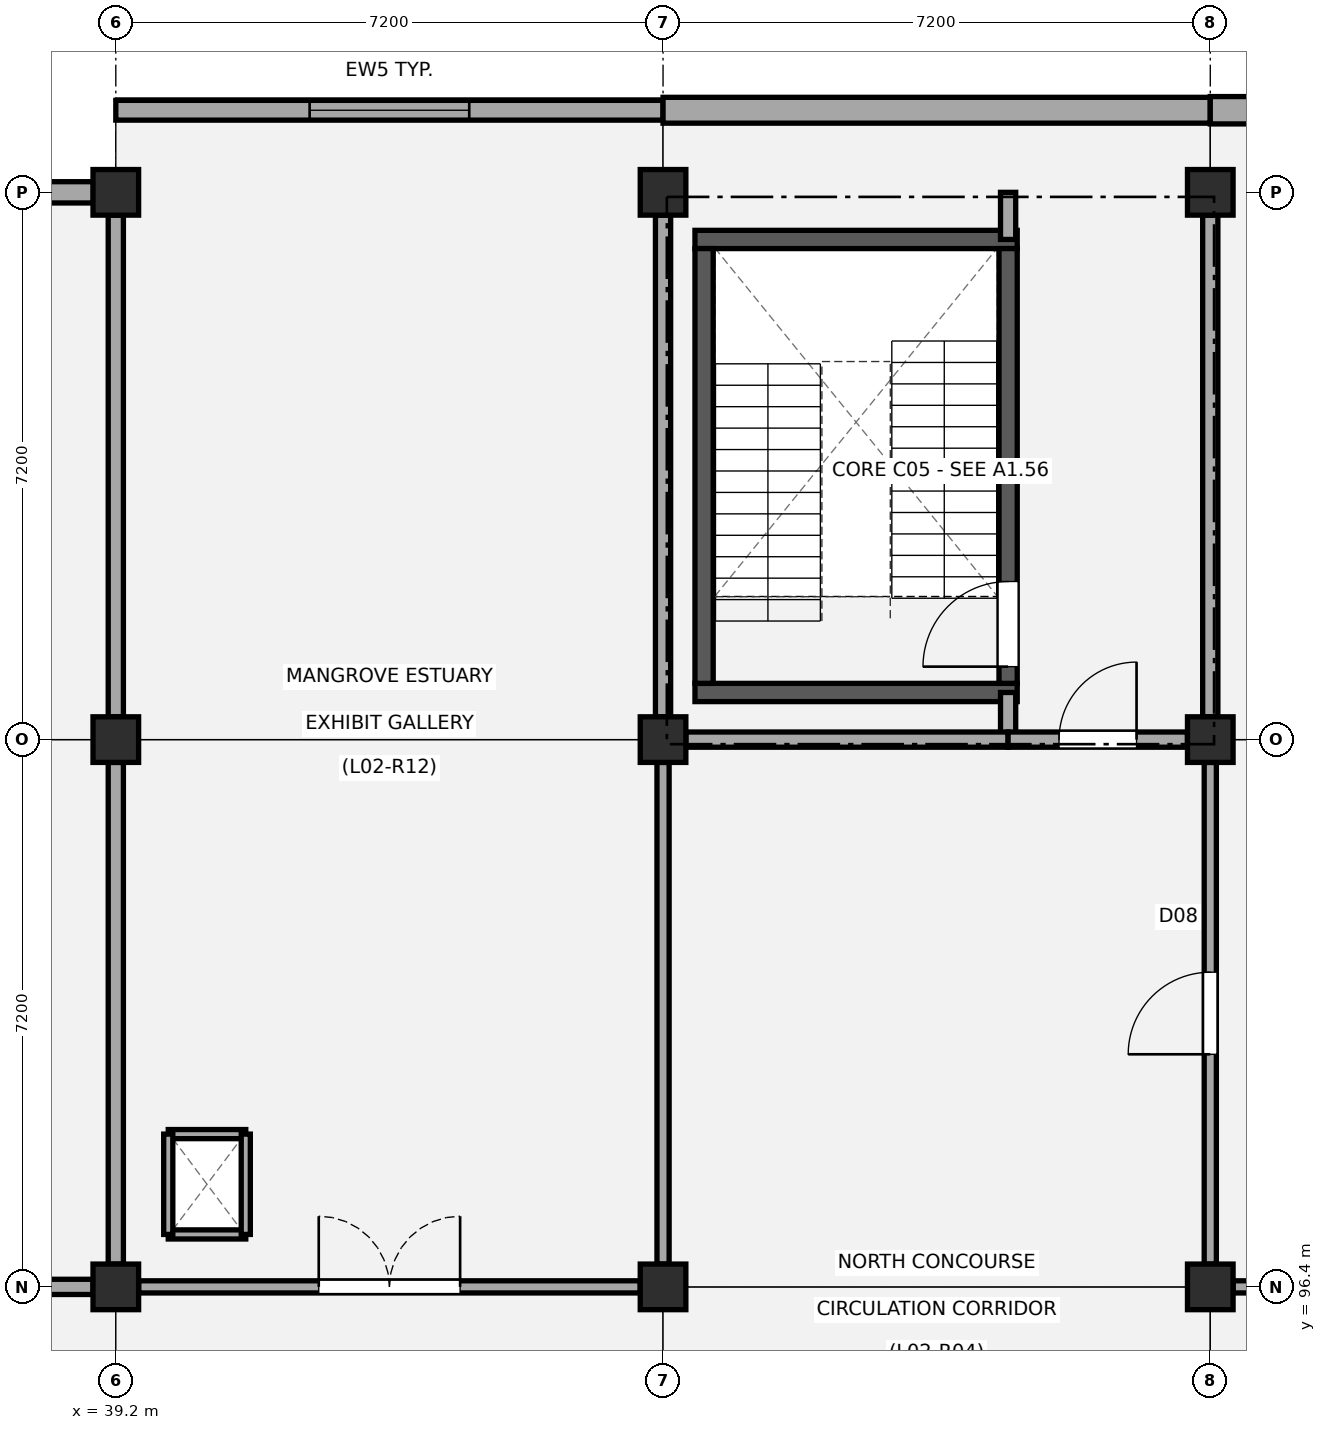
"""IFC4 building model, lengths in metres.
Left out: names, types, materials, properties, quantities, classifications, styles, units other than length and angle.
Written with IfcOpenShell. Run it as: python <this file> out.ifc"""

import sys

from ifc_helpers import new_model, si_unit, direction, frame, frame_2d, origin, origin_2d, place, context, subcontext, project, spatial, rectangle, extrude, element, fill, save


model = new_model("IFC4")
c1 = context("Model", 3, precision=1e-05, world=origin(), true_north=direction((0.0, 1.0)))
c2 = subcontext(c1, "Body", "Model", "MODEL_VIEW")
j1 = project(units=[si_unit("LENGTHUNIT", "METRE"), si_unit("PLANEANGLEUNIT", "RADIAN")], contexts=[c1])
p1 = place(None, origin())
s1 = spatial("IfcSite", under=j1, at=p1, CompositionType="ELEMENT")
p2 = place(p1, origin())
s2 = spatial("IfcBuilding", under=s1, at=p2, CompositionType="ELEMENT")
p3 = place(p2, frame((0.0, 0.0, 9.18)))
s3 = spatial("IfcBuildingStorey", under=s2, at=p3, CompositionType="ELEMENT", Elevation=9.18)
for number, where, z_axis, x_axis in (
    (1, (39.2, 96.4, 0.0), (0.0, 0.0, 1.0), (1.0, 0.0, 0.0)),
    (2, (39.2, 103.6, 0.0), (0.0, 0.0, 1.0), (1.0, 0.0, 0.0)),
    (3, (39.2, 110.8, 0.0), (0.0, 0.0, 1.0), (1.0, 0.0, 0.0)),
    (4, (46.4, 96.4, 0.0), (0.0, 0.0, 1.0), (1.0, 0.0, 0.0)),
    (5, (46.4, 103.6, 0.0), (0.0, 0.0, 1.0), (1.0, 0.0, 0.0)),
    (6, (46.4, 110.8, 0.0), (0.0, 0.0, 1.0), (1.0, 0.0, 0.0)),
    (7, (53.6, 96.4, 0.0), (0.0, 0.0, 1.0), (1.0, 0.0, 0.0)),
    (8, (53.6, 103.6, 0.0), (0.0, 0.0, 1.0), (1.0, 0.0, 0.0)),
    (9, (53.6, 110.8, 0.0), (0.0, 0.0, 1.0), (1.0, 0.0, 0.0)),
):
    element("IfcColumn", number, at=place(p3, frame(where, z_axis=z_axis, x_axis=x_axis)), inside=s3, PredefinedType="COLUMN", context=c2, shape_type="SweptSolid", body=[
        extrude(rectangle(XDim=0.6, YDim=0.6, at=origin_2d()), origin(), (0.0, 0.0, 1.0), 4.32),
    ])
p4 = place(p3, frame((32.295, 110.8, 0.0), z_axis=(0.0, 0.0, 1.0), x_axis=(1.0, 0.0, 0.0)))
e10 = element("IfcWall", 10, at=p4, inside=s3, PredefinedType="STANDARD", context=c2, shape_type="SweptSolid", body=[
    extrude(rectangle(XDim=6.61, YDim=0.28, at=frame_2d((3.305, 0.0))), origin(), (0.0, 0.0, 1.0), 3.48),
])
p5 = place(p3, frame((39.2, 111.88, 0.0), z_axis=(0.0, 0.0, 1.0), x_axis=(1.0, 0.0, 0.0)))
e11 = element("IfcWall", 11, at=p5, inside=s3, PredefinedType="STANDARD", context=c2, shape_type="SweptSolid", body=[
    extrude(rectangle(XDim=7.2, YDim=0.26, at=frame_2d((3.6, 0.0))), origin(), (0.0, 0.0, 1.0), 4.03),
])
p6 = place(p5, frame((2.55, 0.0, 0.95)))
e12 = element("IfcOpeningElement", 12, at=p6, cuts=e11, PredefinedType="OPENING", context=c2, shape_type="SweptSolid", body=[
    extrude(rectangle(XDim=2.1, YDim=1.95, at=frame_2d((1.05, 0.975))), frame((0.0, 0.14, 0.0), z_axis=(0.0, -1.0, 0.0), x_axis=(1.0, 0.0, 0.0)), (0.0, 0.0, 1.0), 0.28),
])
p7 = place(p3, frame((46.4, 111.88, 0.0), z_axis=(0.0, 0.0, 1.0), x_axis=(1.0, 0.0, 0.0)))
e13 = element("IfcWall", 13, at=p7, inside=s3, PredefinedType="STANDARD", context=c2, shape_type="SweptSolid", body=[
    extrude(rectangle(XDim=7.2, YDim=0.34, at=frame_2d((3.6, 0.0))), origin(), (0.0, 0.0, 1.0), 4.01),
])
p8 = place(p3, frame((53.6, 111.88, 0.0), z_axis=(0.0, 0.0, 1.0), x_axis=(1.0, 0.0, 0.0)))
e14 = element("IfcWall", 14, at=p8, inside=s3, PredefinedType="STANDARD", context=c2, shape_type="SweptSolid", body=[
    extrude(rectangle(XDim=7.2, YDim=0.36, at=frame_2d((3.6, 0.0))), origin(), (0.0, 0.0, 1.0), 4.03),
])
p9 = place(p8, frame((2.4, 0.0, 0.95)))
e15 = element("IfcOpeningElement", 15, at=p9, cuts=e14, PredefinedType="OPENING", context=c2, shape_type="SweptSolid", body=[
    extrude(rectangle(XDim=2.4, YDim=1.55, at=frame_2d((1.2, 0.775))), frame((0.0, 0.19, 0.0), z_axis=(0.0, -1.0, 0.0), x_axis=(1.0, 0.0, 0.0)), (0.0, 0.0, 1.0), 0.38),
])
for number, where, z_axis, x_axis in (
    (16, (46.82, 104.22, 0.0), (0.0, 0.0, 1.0), (1.0, 0.0, 0.0)),
    (17, (46.82, 110.18, 0.0), (0.0, 0.0, 1.0), (1.0, 0.0, 0.0)),
):
    element("IfcWall", number, at=place(p3, frame(where, z_axis=z_axis, x_axis=x_axis)), inside=s3, PredefinedType="SHEAR", context=c2, shape_type="SweptSolid", body=[
        extrude(rectangle(XDim=4.24, YDim=0.24, at=frame_2d((2.12, 0.0))), origin(), (0.0, 0.0, 1.0), 4.02),
    ])
p10 = place(p3, frame((46.94, 104.34, 0.0), z_axis=(0.0, 0.0, 1.0), x_axis=(0.0, 1.0, 0.0)))
e18 = element("IfcWall", 18, at=p10, inside=s3, PredefinedType="SHEAR", context=c2, shape_type="SweptSolid", body=[
    extrude(rectangle(XDim=5.72, YDim=0.24, at=frame_2d((2.86, 0.0))), origin(), (0.0, 0.0, 1.0), 4.02),
])
p11 = place(p3, frame((50.94, 104.34, 0.0), z_axis=(0.0, 0.0, 1.0), x_axis=(0.0, 1.0, 0.0)))
e19 = element("IfcWall", 19, at=p11, inside=s3, PredefinedType="SHEAR", context=c2, shape_type="SweptSolid", body=[
    extrude(rectangle(XDim=5.72, YDim=0.24, at=frame_2d((2.86, 0.0))), origin(), (0.0, 0.0, 1.0), 4.02),
])
p12 = place(p11, frame((0.22, 0.0, 0.0)))
e20 = element("IfcOpeningElement", 20, at=p12, cuts=e19, PredefinedType="OPENING", context=c2, shape_type="SweptSolid", body=[
    extrude(rectangle(XDim=1.12, YDim=2.15, at=frame_2d((0.56, 1.075))), frame((0.0, 0.13, 0.0), z_axis=(0.0, -1.0, 0.0), x_axis=(1.0, 0.0, 0.0)), (0.0, 0.0, 1.0), 0.26),
])
p13 = place(p3, frame((50.94, 103.6, 0.0), z_axis=(0.0, 0.0, 1.0), x_axis=(0.0, 1.0, 0.0)))
e21 = element("IfcWall", 21, at=p13, inside=s3, PredefinedType="PARTITIONING", context=c2, shape_type="SweptSolid", body=[
    extrude(rectangle(XDim=0.62, YDim=0.2, at=frame_2d((0.31, 0.0))), origin(), (0.0, 0.0, 1.0), 3.36),
])
p14 = place(p3, frame((50.94, 110.18, 0.0), z_axis=(0.0, 0.0, 1.0), x_axis=(0.0, 1.0, 0.0)))
e22 = element("IfcWall", 22, at=p14, inside=s3, PredefinedType="PARTITIONING", context=c2, shape_type="SweptSolid", body=[
    extrude(rectangle(XDim=0.62, YDim=0.2, at=frame_2d((0.31, 0.0))), origin(), (0.0, 0.0, 1.0), 3.46),
])
for number, where, z_axis, x_axis in (
    (23, (46.4, 103.9, 0.0), (0.0, 0.0, 1.0), (0.0, 1.0, 0.0)),
    (24, (53.6, 103.9, 0.0), (0.0, 0.0, 1.0), (0.0, 1.0, 0.0)),
):
    element("IfcWall", number, at=place(p3, frame(where, z_axis=z_axis, x_axis=x_axis)), inside=s3, PredefinedType="PARTITIONING", context=c2, shape_type="SweptSolid", body=[
        extrude(rectangle(XDim=6.6, YDim=0.2, at=frame_2d((3.3, 0.0))), origin(), (0.0, 0.0, 1.0), 3.36),
    ])
p15 = place(p3, frame((46.7, 103.6, 0.0), z_axis=(0.0, 0.0, 1.0), x_axis=(1.0, 0.0, 0.0)))
e25 = element("IfcWall", 25, at=p15, inside=s3, PredefinedType="PARTITIONING", context=c2, shape_type="SweptSolid", body=[
    extrude(rectangle(XDim=4.24, YDim=0.2, at=frame_2d((2.12, 0.0))), origin(), (0.0, 0.0, 1.0), 3.36),
])
p16 = place(p3, frame((50.94, 103.6, 0.0), z_axis=(0.0, 0.0, 1.0), x_axis=(1.0, 0.0, 0.0)))
e26 = element("IfcWall", 26, at=p16, inside=s3, PredefinedType="PARTITIONING", context=c2, shape_type="SweptSolid", body=[
    extrude(rectangle(XDim=2.36, YDim=0.2, at=frame_2d((1.18, 0.0))), origin(), (0.0, 0.0, 1.0), 3.36),
])
p17 = place(p16, frame((0.67, 0.0, 0.0)))
e27 = element("IfcOpeningElement", 27, at=p17, cuts=e26, PredefinedType="OPENING", context=c2, shape_type="SweptSolid", body=[
    extrude(rectangle(XDim=1.02, YDim=2.15, at=frame_2d((0.51, 1.075))), frame((0.0, 0.11, 0.0), z_axis=(0.0, -1.0, 0.0), x_axis=(1.0, 0.0, 0.0)), (0.0, 0.0, 1.0), 0.22),
])
for number, where, z_axis, x_axis in (
    (28, (39.89, 97.09, 0.0), (0.0, 0.0, 1.0), (1.0, 0.0, 0.0)),
    (29, (39.89, 98.41, 0.0), (0.0, 0.0, 1.0), (1.0, 0.0, 0.0)),
):
    element("IfcWall", number, at=place(p3, frame(where, z_axis=z_axis, x_axis=x_axis)), inside=s3, PredefinedType="PARTITIONING", context=c2, shape_type="SweptSolid", body=[
        extrude(rectangle(XDim=1.02, YDim=0.12, at=frame_2d((0.51, 0.0))), origin(), (0.0, 0.0, 1.0), 4.0),
    ])
for number, where, z_axis, x_axis in (
    (30, (39.89, 97.09, 0.0), (0.0, 0.0, 1.0), (0.0, 1.0, 0.0)),
    (31, (40.91, 97.09, 0.0), (0.0, 0.0, 1.0), (0.0, 1.0, 0.0)),
):
    element("IfcWall", number, at=place(p3, frame(where, z_axis=z_axis, x_axis=x_axis)), inside=s3, PredefinedType="PARTITIONING", context=c2, shape_type="SweptSolid", body=[
        extrude(rectangle(XDim=1.32, YDim=0.12, at=frame_2d((0.66, 0.0))), origin(), (0.0, 0.0, 1.0), 4.0),
    ])
p18 = place(p3, frame((32.3, 96.4, 0.0), z_axis=(0.0, 0.0, 1.0), x_axis=(1.0, 0.0, 0.0)))
e32 = element("IfcWall", 32, at=p18, inside=s3, PredefinedType="PARTITIONING", context=c2, shape_type="SweptSolid", body=[
    extrude(rectangle(XDim=6.6, YDim=0.2, at=frame_2d((3.3, 0.0))), origin(), (0.0, 0.0, 1.0), 3.43),
])
p19 = place(p3, frame((39.2, 96.7, 0.0), z_axis=(0.0, 0.0, 1.0), x_axis=(0.0, 1.0, 0.0)))
e33 = element("IfcWall", 33, at=p19, inside=s3, PredefinedType="PARTITIONING", context=c2, shape_type="SweptSolid", body=[
    extrude(rectangle(XDim=6.6, YDim=0.2, at=frame_2d((3.3, 0.0))), origin(), (0.0, 0.0, 1.0), 3.41),
])
p20 = place(p3, frame((39.2, 103.9, 0.0), z_axis=(0.0, 0.0, 1.0), x_axis=(0.0, 1.0, 0.0)))
e34 = element("IfcWall", 34, at=p20, inside=s3, PredefinedType="PARTITIONING", context=c2, shape_type="SweptSolid", body=[
    extrude(rectangle(XDim=6.6, YDim=0.2, at=frame_2d((3.3, 0.0))), origin(), (0.0, 0.0, 1.0), 3.38),
])
p21 = place(p3, frame((39.5, 96.4, 0.0), z_axis=(0.0, 0.0, 1.0), x_axis=(1.0, 0.0, 0.0)))
e35 = element("IfcWall", 35, at=p21, inside=s3, PredefinedType="PARTITIONING", context=c2, shape_type="SweptSolid", body=[
    extrude(rectangle(XDim=6.6, YDim=0.16, at=frame_2d((3.3, 0.0))), origin(), (0.0, 0.0, 1.0), 3.36),
])
p22 = place(p21, frame((2.37, 0.0, 0.0)))
e36 = element("IfcOpeningElement", 36, at=p22, cuts=e35, PredefinedType="OPENING", context=c2, shape_type="SweptSolid", body=[
    extrude(rectangle(XDim=1.86, YDim=2.26, at=frame_2d((0.93, 1.13))), frame((0.0, 0.09, 0.0), z_axis=(0.0, -1.0, 0.0), x_axis=(1.0, 0.0, 0.0)), (0.0, 0.0, 1.0), 0.18),
])
p23 = place(p3, frame((46.4, 96.7, 0.0), z_axis=(0.0, 0.0, 1.0), x_axis=(0.0, 1.0, 0.0)))
e37 = element("IfcWall", 37, at=p23, inside=s3, PredefinedType="PARTITIONING", context=c2, shape_type="SweptSolid", body=[
    extrude(rectangle(XDim=6.6, YDim=0.16, at=frame_2d((3.3, 0.0))), origin(), (0.0, 0.0, 1.0), 3.41),
])
p24 = place(p3, frame((53.6, 96.7, 0.0), z_axis=(0.0, 0.0, 1.0), x_axis=(0.0, 1.0, 0.0)))
e38 = element("IfcWall", 38, at=p24, inside=s3, PredefinedType="PARTITIONING", context=c2, shape_type="SweptSolid", body=[
    extrude(rectangle(XDim=6.6, YDim=0.16, at=frame_2d((3.3, 0.0))), origin(), (0.0, 0.0, 1.0), 3.41),
])
p25 = place(p24, frame((2.76, 0.0, 0.0)))
e39 = element("IfcOpeningElement", 39, at=p25, cuts=e38, PredefinedType="OPENING", context=c2, shape_type="SweptSolid", body=[
    extrude(rectangle(XDim=1.08, YDim=2.16, at=frame_2d((0.54, 1.08))), frame((0.0, 0.09, 0.0), z_axis=(0.0, -1.0, 0.0), x_axis=(1.0, 0.0, 0.0)), (0.0, 0.0, 1.0), 0.18),
])
p26 = place(p3, frame((53.9, 96.4, 0.0), z_axis=(0.0, 0.0, 1.0), x_axis=(1.0, 0.0, 0.0)))
e40 = element("IfcWall", 40, at=p26, inside=s3, PredefinedType="PARTITIONING", context=c2, shape_type="SweptSolid", body=[
    extrude(rectangle(XDim=6.6, YDim=0.16, at=frame_2d((3.3, 0.0))), origin(), (0.0, 0.0, 1.0), 3.36),
])
p27 = place(p6, origin())
e41 = element("IfcWindow", 41, at=p27, inside=s3, PartitioningType="SINGLE_PANEL", PredefinedType="WINDOW", context=c2, shape_type="SweptSolid", body=[
    extrude(rectangle(XDim=2.1, YDim=1.95, at=frame_2d((1.05, 0.975))), frame((0.0, 0.03, 0.0), z_axis=(0.0, -1.0, 0.0), x_axis=(1.0, 0.0, 0.0)), (0.0, 0.0, 1.0), 0.06),
])
fill(e12, e41)
p28 = place(p12, origin())
e42 = element("IfcDoor", 42, at=p28, inside=s3, OperationType="SINGLE_SWING_LEFT", PredefinedType="DOOR", context=c2, shape_type="SweptSolid", body=[
    extrude(rectangle(XDim=1.12, YDim=2.15, at=frame_2d((0.56, 1.075))), frame((0.0, 0.025, 0.0), z_axis=(0.0, -1.0, 0.0), x_axis=(1.0, 0.0, 0.0)), (0.0, 0.0, 1.0), 0.05),
])
fill(e20, e42)
p29 = place(p17, origin())
e43 = element("IfcDoor", 43, at=p29, inside=s3, OperationType="SINGLE_SWING_RIGHT", PredefinedType="DOOR", context=c2, shape_type="SweptSolid", body=[
    extrude(rectangle(XDim=1.02, YDim=2.15, at=frame_2d((0.51, 1.075))), frame((0.0, 0.025, 0.0), z_axis=(0.0, -1.0, 0.0), x_axis=(1.0, 0.0, 0.0)), (0.0, 0.0, 1.0), 0.05),
])
fill(e27, e43)
p30 = place(p22, origin())
e44 = element("IfcDoor", 44, at=p30, inside=s3, OperationType="DOUBLE_DOOR_SINGLE_SWING", PredefinedType="DOOR", context=c2, shape_type="SweptSolid", body=[
    extrude(rectangle(XDim=1.86, YDim=2.26, at=frame_2d((0.93, 1.13))), frame((0.0, 0.025, 0.0), z_axis=(0.0, -1.0, 0.0), x_axis=(1.0, 0.0, 0.0)), (0.0, 0.0, 1.0), 0.05),
])
fill(e36, e44)
p31 = place(p25, origin())
e45 = element("IfcDoor", 45, at=p31, inside=s3, OperationType="SINGLE_SWING_LEFT", PredefinedType="DOOR", context=c2, shape_type="SweptSolid", body=[
    extrude(rectangle(XDim=1.08, YDim=2.16, at=frame_2d((0.54, 1.08))), frame((0.0, 0.025, 0.0), z_axis=(0.0, -1.0, 0.0), x_axis=(1.0, 0.0, 0.0)), (0.0, 0.0, 1.0), 0.05),
])
fill(e39, e45)
save(model, sys.argv[1])
